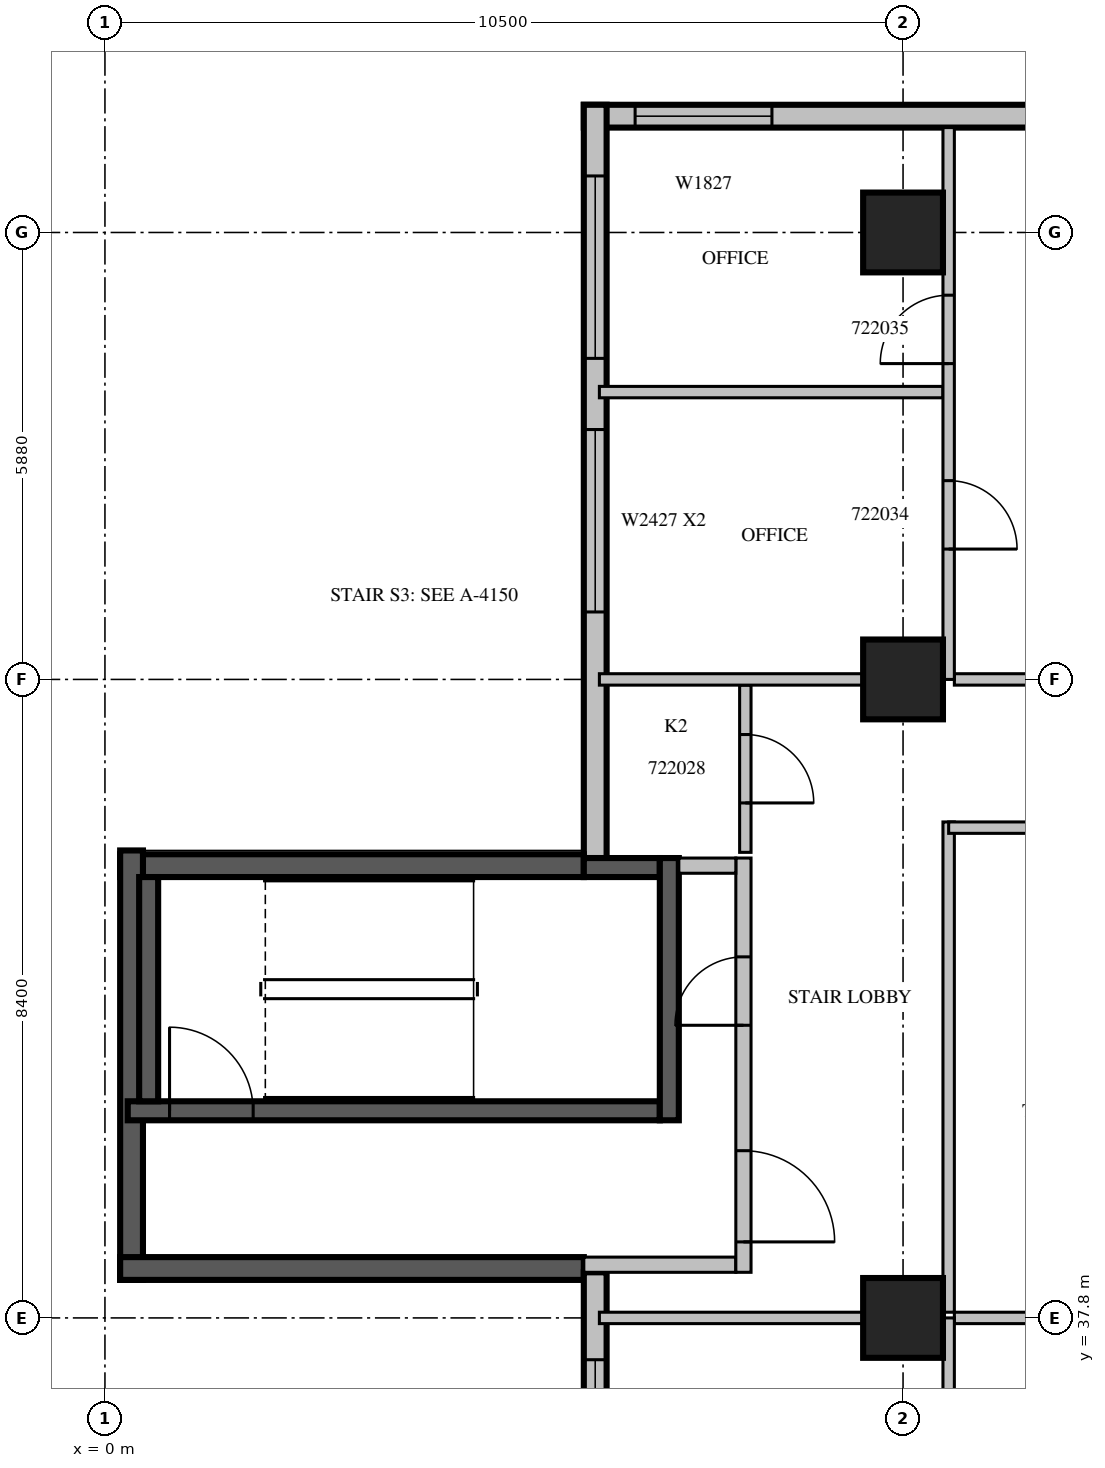
"""IFC4 building model, lengths in metres.
Left out: names, types, materials, properties, quantities, classifications, styles, units other than length and angle.
Written with IfcOpenShell. Run it as: python <this file> out.ifc"""

import sys

from ifc_helpers import new_model, si_unit, direction, frame, frame_2d, origin, origin_2d, place, context, subcontext, project, spatial, rectangle, extrude, source, transform, mapped, element, fill, save


model = new_model("IFC4")
c1 = context("Model", 3, precision=1e-05, world=origin(), true_north=direction((0.0, 1.0)))
c2 = subcontext(c1, "Body", "Model", "MODEL_VIEW")
j1 = project(units=[si_unit("LENGTHUNIT", "METRE"), si_unit("PLANEANGLEUNIT", "RADIAN")], contexts=[c1])
p1 = place(None, origin())
s1 = spatial("IfcSite", under=j1, at=p1, CompositionType="ELEMENT")
p2 = place(p1, origin())
s2 = spatial("IfcBuilding", under=s1, at=p2, CompositionType="ELEMENT")
p3 = place(p2, frame((0.0, 0.0, 103.5)))
s3 = spatial("IfcBuildingStorey", under=s2, at=p3, CompositionType="ELEMENT", Elevation=103.5)
m1 = source(origin(), c2, "Body", "SweptSolid", [
    extrude(rectangle(XDim=1.05, YDim=1.05, at=origin_2d()), origin(), (0.0, 0.0, 1.0), 4.2),
])
for number, where, z_axis, x_axis in (
    (1, (10.5, 37.8, 0.0), (0.0, 0.0, 1.0), (1.0, 0.0, 0.0)),
    (2, (10.5, 46.2, 0.0), (0.0, 0.0, 1.0), (1.0, 0.0, 0.0)),
    (3, (10.5, 52.08, 0.0), (0.0, 0.0, 1.0), (1.0, 0.0, 0.0)),
):
    element("IfcColumn", number, at=place(p3, frame(where, z_axis=z_axis, x_axis=x_axis)), inside=s3, PredefinedType="COLUMN", context=c2, shape_type="MappedRepresentation", body=[
        mapped(m1, transform((0.0, 0.0, 0.0), scale=1.0)),
    ])
m2 = source(origin(), c2, "Body", "SweptSolid", [
    extrude(rectangle(XDim=10.5, YDim=0.3, at=frame_2d((5.25, 0.0))), origin(), (0.0, 0.0, 1.0), 3.8),
])
p4 = place(p3, frame((16.8, 53.61, 0.0), z_axis=(0.0, 0.0, 1.0), x_axis=(-1.0, 0.0, 0.0)))
e4 = element("IfcWall", 4, at=p4, inside=s3, PredefinedType="STANDARD", context=c2, shape_type="MappedRepresentation", body=[
    mapped(m2, transform((0.0, 0.0, 0.0), scale=1.0)),
])
m3 = source(origin(), c2, "Body", "SweptSolid", [
    extrude(rectangle(XDim=1.2, YDim=2.7, at=frame_2d((0.6, 1.35))), frame((0.0, 0.16, 0.0), z_axis=(0.0, -1.0, 0.0), x_axis=(1.0, 0.0, 0.0)), (0.0, 0.0, 1.0), 0.32),
])
p5 = place(p4, frame((2.15, 0.0, 0.6)))
e5 = element("IfcOpeningElement", 5, at=p5, cuts=e4, PredefinedType="OPENING", context=c2, shape_type="MappedRepresentation", body=[
    mapped(m3, transform((0.0, 0.0, 0.0), scale=1.0)),
])
m4 = source(origin(), c2, "Body", "SweptSolid", [
    extrude(rectangle(XDim=1.8, YDim=2.7, at=frame_2d((0.9, 1.35))), frame((0.0, 0.16, 0.0), z_axis=(0.0, -1.0, 0.0), x_axis=(1.0, 0.0, 0.0)), (0.0, 0.0, 1.0), 0.32),
])
p6 = place(p4, frame((8.025, 0.0, 0.6)))
e6 = element("IfcOpeningElement", 6, at=p6, cuts=e4, PredefinedType="OPENING", context=c2, shape_type="MappedRepresentation", body=[
    mapped(m4, transform((0.0, 0.0, 0.0), scale=1.0)),
])
m5 = source(origin(), c2, "Body", "SweptSolid", [
    extrude(rectangle(XDim=9.91, YDim=0.3, at=frame_2d((4.955, 0.0))), origin(), (0.0, 0.0, 1.0), 3.8),
])
p7 = place(p3, frame((6.45, 53.76, 0.0), z_axis=(0.0, 0.0, 1.0), x_axis=(0.0, -1.0, 0.0)))
e7 = element("IfcWall", 7, at=p7, inside=s3, PredefinedType="STANDARD", context=c2, shape_type="MappedRepresentation", body=[
    mapped(m5, transform((0.0, 0.0, 0.0), scale=1.0)),
])
m6 = source(origin(), c2, "Body", "SweptSolid", [
    extrude(rectangle(XDim=2.4, YDim=2.7, at=frame_2d((1.2, 1.35))), frame((0.0, 0.16, 0.0), z_axis=(0.0, -1.0, 0.0), x_axis=(1.0, 0.0, 0.0)), (0.0, 0.0, 1.0), 0.32),
])
p8 = place(p7, frame((4.272, 0.0, 0.6)))
e8 = element("IfcOpeningElement", 8, at=p8, cuts=e7, PredefinedType="OPENING", context=c2, shape_type="MappedRepresentation", body=[
    mapped(m6, transform((0.0, 0.0, 0.0), scale=1.0)),
])
p9 = place(p7, frame((0.936, 0.0, 0.6)))
e9 = element("IfcOpeningElement", 9, at=p9, cuts=e7, PredefinedType="OPENING", context=c2, shape_type="MappedRepresentation", body=[
    mapped(m6, transform((0.0, 0.0, 0.0), scale=1.0)),
])
m7 = source(origin(), c2, "Body", "SweptSolid", [
    extrude(rectangle(XDim=6.1, YDim=0.3, at=frame_2d((3.05, 0.0))), origin(), (0.0, 0.0, 1.0), 3.8),
])
p10 = place(p3, frame((6.3, 43.75, 0.0), z_axis=(0.0, 0.0, 1.0), x_axis=(-1.0, 0.0, 0.0)))
e10 = element("IfcWall", 10, at=p10, inside=s3, PredefinedType="SOLIDWALL", context=c2, shape_type="MappedRepresentation", body=[
    mapped(m7, transform((0.0, 0.0, 0.0), scale=1.0)),
])
m8 = source(origin(), c2, "Body", "SweptSolid", [
    extrude(rectangle(XDim=5.65, YDim=0.3, at=frame_2d((2.825, 0.0))), origin(), (0.0, 0.0, 1.0), 3.8),
])
p11 = place(p3, frame((0.35, 43.95, 0.0), z_axis=(0.0, 0.0, 1.0), x_axis=(0.0, -1.0, 0.0)))
e11 = element("IfcWall", 11, at=p11, inside=s3, PredefinedType="SOLIDWALL", context=c2, shape_type="MappedRepresentation", body=[
    mapped(m8, transform((0.0, 0.0, 0.0), scale=1.0)),
])
p12 = place(p3, frame((0.2, 38.45, 0.0), z_axis=(0.0, 0.0, 1.0), x_axis=(1.0, 0.0, 0.0)))
e12 = element("IfcWall", 12, at=p12, inside=s3, PredefinedType="SOLIDWALL", context=c2, shape_type="MappedRepresentation", body=[
    mapped(m7, transform((0.0, 0.0, 0.0), scale=1.0)),
])
p13 = place(p3, frame((6.45, 38.4, 0.0), z_axis=(0.0, 0.0, 1.0), x_axis=(0.0, -1.0, 0.0)))
e13 = element("IfcWall", 13, at=p13, inside=s3, PredefinedType="STANDARD", context=c2, shape_type="SweptSolid", body=[
    extrude(rectangle(XDim=16.4, YDim=0.3, at=frame_2d((8.2, 0.0))), origin(), (0.0, 0.0, 1.0), 3.3),
])
p14 = place(p13, frame((1.15, 0.0, 0.6)))
e14 = element("IfcOpeningElement", 14, at=p14, cuts=e13, PredefinedType="OPENING", context=c2, shape_type="MappedRepresentation", body=[
    mapped(m4, transform((0.0, 0.0, 0.0), scale=1.0)),
])
p15 = place(p13, frame((4.75, 0.0, 0.6)))
e15 = element("IfcOpeningElement", 15, at=p15, cuts=e13, PredefinedType="OPENING", context=c2, shape_type="MappedRepresentation", body=[
    mapped(m6, transform((0.0, 0.0, 0.0), scale=1.0)),
])
p16 = place(p13, frame((9.438, 0.0, 0.6)))
e16 = element("IfcOpeningElement", 16, at=p16, cuts=e13, PredefinedType="OPENING", context=c2, shape_type="MappedRepresentation", body=[
    mapped(m4, transform((0.0, 0.0, 0.0), scale=1.0)),
])
p17 = place(p13, frame((13.537, 0.0, 0.6)))
e17 = element("IfcOpeningElement", 17, at=p17, cuts=e13, PredefinedType="OPENING", context=c2, shape_type="MappedRepresentation", body=[
    mapped(m4, transform((0.0, 0.0, 0.0), scale=1.0)),
])
m9 = source(origin(), c2, "Body", "SweptSolid", [
    extrude(rectangle(XDim=7.0, YDim=0.25, at=frame_2d((3.5, 0.0))), origin(), (0.0, 0.0, 1.0), 3.8),
])
p18 = place(p3, frame((0.3, 40.525, 0.0), z_axis=(0.0, 0.0, 1.0), x_axis=(1.0, 0.0, 0.0)))
e18 = element("IfcWall", 18, at=p18, inside=s3, PredefinedType="SOLIDWALL", context=c2, shape_type="MappedRepresentation", body=[
    mapped(m9, transform((0.0, 0.0, 0.0), scale=1.0)),
])
m10 = source(origin(), c2, "Body", "SweptSolid", [
    extrude(rectangle(XDim=1.1, YDim=2.1, at=frame_2d((0.55, 1.05))), frame((0.0, 0.135, 0.0), z_axis=(0.0, -1.0, 0.0), x_axis=(1.0, 0.0, 0.0)), (0.0, 0.0, 1.0), 0.27),
])
p19 = place(p18, frame((0.55, 0.0, 0.0)))
e19 = element("IfcOpeningElement", 19, at=p19, cuts=e18, PredefinedType="OPENING", context=c2, shape_type="MappedRepresentation", body=[
    mapped(m10, transform((0.0, 0.0, 0.0), scale=1.0)),
])
m11 = source(origin(), c2, "Body", "SweptSolid", [
    extrude(rectangle(XDim=1.0, YDim=0.25, at=frame_2d((0.5, 0.0))), origin(), (0.0, 0.0, 1.0), 3.8),
])
p20 = place(p3, frame((6.3, 43.725, 0.0), z_axis=(0.0, 0.0, 1.0), x_axis=(1.0, 0.0, 0.0)))
e20 = element("IfcWall", 20, at=p20, inside=s3, PredefinedType="SOLIDWALL", context=c2, shape_type="MappedRepresentation", body=[
    mapped(m11, transform((0.0, 0.0, 0.0), scale=1.0)),
])
m12 = source(origin(), c2, "Body", "SweptSolid", [
    extrude(rectangle(XDim=3.45, YDim=0.25, at=frame_2d((1.725, 0.0))), origin(), (0.0, 0.0, 1.0), 3.8),
])
p21 = place(p3, frame((7.425, 40.4, 0.0), z_axis=(0.0, 0.0, 1.0), x_axis=(0.0, 1.0, 0.0)))
e21 = element("IfcWall", 21, at=p21, inside=s3, PredefinedType="SOLIDWALL", context=c2, shape_type="MappedRepresentation", body=[
    mapped(m12, transform((0.0, 0.0, 0.0), scale=1.0)),
])
m13 = source(origin(), c2, "Body", "SweptSolid", [
    extrude(rectangle(XDim=2.95, YDim=0.25, at=frame_2d((1.475, 0.0))), origin(), (0.0, 0.0, 1.0), 3.8),
])
p22 = place(p3, frame((0.575, 40.65, 0.0), z_axis=(0.0, 0.0, 1.0), x_axis=(0.0, 1.0, 0.0)))
e22 = element("IfcWall", 22, at=p22, inside=s3, PredefinedType="SOLIDWALL", context=c2, shape_type="MappedRepresentation", body=[
    mapped(m13, transform((0.0, 0.0, 0.0), scale=1.0)),
])
m14 = source(origin(), c2, "Body", "SweptSolid", [
    extrude(rectangle(XDim=2.0, YDim=0.2, at=frame_2d((1.0, 0.0))), origin(), (0.0, 0.0, 1.0), 3.8),
])
p23 = place(p3, frame((6.3, 38.5, 0.0), z_axis=(0.0, 0.0, 1.0), x_axis=(1.0, 0.0, 0.0)))
e23 = element("IfcWall", 23, at=p23, inside=s3, PredefinedType="PARTITIONING", context=c2, shape_type="MappedRepresentation", body=[
    mapped(m14, transform((0.0, 0.0, 0.0), scale=1.0)),
])
m15 = source(origin(), c2, "Body", "SweptSolid", [
    extrude(rectangle(XDim=5.45, YDim=0.2, at=frame_2d((2.725, 0.0))), origin(), (0.0, 0.0, 1.0), 3.8),
])
p24 = place(p3, frame((8.4, 38.4, 0.0), z_axis=(0.0, 0.0, 1.0), x_axis=(0.0, 1.0, 0.0)))
e24 = element("IfcWall", 24, at=p24, inside=s3, PredefinedType="PARTITIONING", context=c2, shape_type="MappedRepresentation", body=[
    mapped(m15, transform((0.0, 0.0, 0.0), scale=1.0)),
])
m16 = source(origin(), c2, "Body", "SweptSolid", [
    extrude(rectangle(XDim=1.2, YDim=2.1, at=frame_2d((0.6, 1.05))), frame((0.0, 0.11, 0.0), z_axis=(0.0, -1.0, 0.0), x_axis=(1.0, 0.0, 0.0)), (0.0, 0.0, 1.0), 0.22),
])
p25 = place(p24, frame((0.4, 0.0, 0.0)))
e25 = element("IfcOpeningElement", 25, at=p25, cuts=e24, PredefinedType="OPENING", context=c2, shape_type="MappedRepresentation", body=[
    mapped(m16, transform((0.0, 0.0, 0.0), scale=1.0)),
])
m17 = source(origin(), c2, "Body", "SweptSolid", [
    extrude(rectangle(XDim=0.9, YDim=2.1, at=frame_2d((0.45, 1.05))), frame((0.0, 0.11, 0.0), z_axis=(0.0, -1.0, 0.0), x_axis=(1.0, 0.0, 0.0)), (0.0, 0.0, 1.0), 0.22),
])
p26 = place(p24, frame((3.25, 0.0, 0.0)))
e26 = element("IfcOpeningElement", 26, at=p26, cuts=e24, PredefinedType="OPENING", context=c2, shape_type="MappedRepresentation", body=[
    mapped(m17, transform((0.0, 0.0, 0.0), scale=1.0)),
])
m18 = source(origin(), c2, "Body", "SweptSolid", [
    extrude(rectangle(XDim=0.75, YDim=0.2, at=frame_2d((0.375, 0.0))), origin(), (0.0, 0.0, 1.0), 3.8),
])
p27 = place(p3, frame((7.55, 43.75, 0.0), z_axis=(0.0, 0.0, 1.0), x_axis=(1.0, 0.0, 0.0)))
e27 = element("IfcWall", 27, at=p27, inside=s3, PredefinedType="PARTITIONING", context=c2, shape_type="MappedRepresentation", body=[
    mapped(m18, transform((0.0, 0.0, 0.0), scale=1.0)),
])
m19 = source(origin(), c2, "Body", "SweptSolid", [
    extrude(rectangle(XDim=6.45, YDim=0.15, at=frame_2d((3.225, 0.0))), origin(), (0.0, 0.0, 1.0), 3.8),
])
p28 = place(p3, frame((11.1, 44.325, 0.0), z_axis=(0.0, 0.0, 1.0), x_axis=(0.0, -1.0, 0.0)))
e28 = element("IfcWall", 28, at=p28, inside=s3, PredefinedType="PARTITIONING", context=c2, shape_type="MappedRepresentation", body=[
    mapped(m19, transform((0.0, 0.0, 0.0), scale=1.0)),
])
m20 = source(origin(), c2, "Body", "SweptSolid", [
    extrude(rectangle(XDim=3.975, YDim=0.15, at=frame_2d((1.988, 0.0))), origin(), (0.0, 0.0, 1.0), 3.8),
])
p29 = place(p3, frame((15.075, 44.25, 0.0), z_axis=(0.0, 0.0, 1.0), x_axis=(-1.0, 0.0, 0.0)))
e29 = element("IfcWall", 29, at=p29, inside=s3, PredefinedType="PARTITIONING", context=c2, shape_type="MappedRepresentation", body=[
    mapped(m20, transform((0.0, 0.0, 0.0), scale=1.0)),
])
m21 = source(origin(), c2, "Body", "SweptSolid", [
    extrude(rectangle(XDim=2.2, YDim=0.15, at=frame_2d((1.1, 0.0))), origin(), (0.0, 0.0, 1.0), 3.8),
])
p30 = place(p3, frame((8.425, 43.925, 0.0), z_axis=(0.0, 0.0, 1.0), x_axis=(0.0, 1.0, 0.0)))
e30 = element("IfcWall", 30, at=p30, inside=s3, PredefinedType="PARTITIONING", context=c2, shape_type="MappedRepresentation", body=[
    mapped(m21, transform((0.0, 0.0, 0.0), scale=1.0)),
])
m22 = source(origin(), c2, "Body", "SweptSolid", [
    extrude(rectangle(XDim=0.9, YDim=2.1, at=frame_2d((0.45, 1.05))), frame((0.0, 0.085, 0.0), z_axis=(0.0, -1.0, 0.0), x_axis=(1.0, 0.0, 0.0)), (0.0, 0.0, 1.0), 0.17),
])
p31 = place(p30, frame((0.65, 0.0, 0.0)))
e31 = element("IfcOpeningElement", 31, at=p31, cuts=e30, PredefinedType="OPENING", context=c2, shape_type="MappedRepresentation", body=[
    mapped(m22, transform((0.0, 0.0, 0.0), scale=1.0)),
])
m23 = source(origin(), c2, "Body", "SweptSolid", [
    extrude(rectangle(XDim=3.471, YDim=0.15, at=frame_2d((1.736, 0.0))), origin(), (0.0, 0.0, 1.0), 3.8),
])
p32 = place(p3, frame((9.976, 37.8, 0.0), z_axis=(0.0, 0.0, 1.0), x_axis=(-1.0, 0.0, 0.0)))
e32 = element("IfcWall", 32, at=p32, inside=s3, PredefinedType="PARTITIONING", context=c2, shape_type="MappedRepresentation", body=[
    mapped(m23, transform((0.0, 0.0, 0.0), scale=1.0)),
])
m24 = source(origin(), c2, "Body", "SweptSolid", [
    extrude(rectangle(XDim=3.825, YDim=0.15, at=frame_2d((1.913, 0.0))), origin(), (0.0, 0.0, 1.0), 3.8),
])
p33 = place(p3, frame((15.0, 37.8, 0.0), z_axis=(0.0, 0.0, 1.0), x_axis=(-1.0, 0.0, 0.0)))
e33 = element("IfcWall", 33, at=p33, inside=s3, PredefinedType="PARTITIONING", context=c2, shape_type="MappedRepresentation", body=[
    mapped(m24, transform((0.0, 0.0, 0.0), scale=1.0)),
])
m25 = source(origin(), c2, "Body", "SweptSolid", [
    extrude(rectangle(XDim=8.4, YDim=0.15, at=frame_2d((4.2, 0.0))), origin(), (0.0, 0.0, 1.0), 3.3),
])
p34 = place(p3, frame((11.1, 29.4, 0.0), z_axis=(0.0, 0.0, 1.0), x_axis=(0.0, 1.0, 0.0)))
e34 = element("IfcWall", 34, at=p34, inside=s3, PredefinedType="PARTITIONING", context=c2, shape_type="MappedRepresentation", body=[
    mapped(m25, transform((0.0, 0.0, 0.0), scale=1.0)),
])
m26 = source(origin(), c2, "Body", "SweptSolid", [
    extrude(rectangle(XDim=1.1, YDim=2.1, at=frame_2d((0.55, 1.05))), frame((0.0, 0.085, 0.0), z_axis=(0.0, -1.0, 0.0), x_axis=(1.0, 0.0, 0.0)), (0.0, 0.0, 1.0), 0.17),
])
p35 = place(p34, frame((5.96, 0.0, 0.0)))
e35 = element("IfcOpeningElement", 35, at=p35, cuts=e34, PredefinedType="OPENING", context=c2, shape_type="MappedRepresentation", body=[
    mapped(m26, transform((0.0, 0.0, 0.0), scale=1.0)),
])
p36 = place(p3, frame((11.025, 49.98, 0.0), z_axis=(0.0, 0.0, 1.0), x_axis=(-1.0, 0.0, 0.0)))
e36 = element("IfcWall", 36, at=p36, inside=s3, PredefinedType="PARTITIONING", context=c2, shape_type="SweptSolid", body=[
    extrude(rectangle(XDim=4.52, YDim=0.15, at=frame_2d((2.26, 0.0))), origin(), (0.0, 0.0, 1.0), 3.8),
])
p37 = place(p3, frame((9.976, 46.2, 0.0), z_axis=(0.0, 0.0, 1.0), x_axis=(-1.0, 0.0, 0.0)))
e37 = element("IfcWall", 37, at=p37, inside=s3, PredefinedType="PARTITIONING", context=c2, shape_type="MappedRepresentation", body=[
    mapped(m23, transform((0.0, 0.0, 0.0), scale=1.0)),
])
p38 = place(p3, frame((15.0, 46.2, 0.0), z_axis=(0.0, 0.0, 1.0), x_axis=(-1.0, 0.0, 0.0)))
e38 = element("IfcWall", 38, at=p38, inside=s3, PredefinedType="PARTITIONING", context=c2, shape_type="MappedRepresentation", body=[
    mapped(m24, transform((0.0, 0.0, 0.0), scale=1.0)),
])
m27 = source(origin(), c2, "Body", "SweptSolid", [
    extrude(rectangle(XDim=7.26, YDim=0.15, at=frame_2d((3.63, 0.0))), origin(), (0.0, 0.0, 1.0), 3.8),
])
p39 = place(p3, frame((11.1, 46.2, 0.0), z_axis=(0.0, 0.0, 1.0), x_axis=(0.0, 1.0, 0.0)))
e39 = element("IfcWall", 39, at=p39, inside=s3, PredefinedType="PARTITIONING", context=c2, shape_type="MappedRepresentation", body=[
    mapped(m27, transform((0.0, 0.0, 0.0), scale=1.0)),
])
p40 = place(p39, frame((1.715, 0.0, 0.0)))
e40 = element("IfcOpeningElement", 40, at=p40, cuts=e39, PredefinedType="OPENING", context=c2, shape_type="MappedRepresentation", body=[
    mapped(m22, transform((0.0, 0.0, 0.0), scale=1.0)),
])
p41 = place(p39, frame((4.155, 0.0, 0.0)))
e41 = element("IfcOpeningElement", 41, at=p41, cuts=e39, PredefinedType="OPENING", context=c2, shape_type="MappedRepresentation", body=[
    mapped(m22, transform((0.0, 0.0, 0.0), scale=1.0)),
])
m28 = source(origin(), c2, "Body", "SweptSolid", [
    extrude(rectangle(XDim=1.8, YDim=2.7, at=frame_2d((0.9, 1.35))), frame((0.0, 0.03, 0.0), z_axis=(0.0, -1.0, 0.0), x_axis=(1.0, 0.0, 0.0)), (0.0, 0.0, 1.0), 0.06),
])
p42 = place(p6, origin())
e42 = element("IfcWindow", 42, at=p42, inside=s3, PartitioningType="SINGLE_PANEL", PredefinedType="WINDOW", context=c2, shape_type="MappedRepresentation", body=[
    mapped(m28, transform((0.0, 0.0, 0.0), scale=1.0)),
])
fill(e6, e42)
m29 = source(origin(), c2, "Body", "SweptSolid", [
    extrude(rectangle(XDim=2.4, YDim=2.7, at=frame_2d((1.2, 1.35))), frame((0.0, 0.03, 0.0), z_axis=(0.0, -1.0, 0.0), x_axis=(1.0, 0.0, 0.0)), (0.0, 0.0, 1.0), 0.06),
])
p43 = place(p8, origin())
e43 = element("IfcWindow", 43, at=p43, inside=s3, PartitioningType="SINGLE_PANEL", PredefinedType="WINDOW", context=c2, shape_type="MappedRepresentation", body=[
    mapped(m29, transform((0.0, 0.0, 0.0), scale=1.0)),
])
fill(e8, e43)
p44 = place(p9, origin())
e44 = element("IfcWindow", 44, at=p44, inside=s3, PartitioningType="SINGLE_PANEL", PredefinedType="WINDOW", context=c2, shape_type="MappedRepresentation", body=[
    mapped(m29, transform((0.0, 0.0, 0.0), scale=1.0)),
])
fill(e9, e44)
p45 = place(p14, origin())
e45 = element("IfcWindow", 45, at=p45, inside=s3, PartitioningType="SINGLE_PANEL", PredefinedType="WINDOW", context=c2, shape_type="MappedRepresentation", body=[
    mapped(m28, transform((0.0, 0.0, 0.0), scale=1.0)),
])
fill(e14, e45)
m30 = source(origin(), c2, "Body", "SweptSolid", [
    extrude(rectangle(XDim=1.1, YDim=2.1, at=frame_2d((0.55, 1.05))), frame((0.0, 0.025, 0.0), z_axis=(0.0, -1.0, 0.0), x_axis=(1.0, 0.0, 0.0)), (0.0, 0.0, 1.0), 0.05),
])
p46 = place(p19, origin())
e46 = element("IfcDoor", 46, at=p46, inside=s3, OperationType="SINGLE_SWING_LEFT", PredefinedType="DOOR", context=c2, shape_type="MappedRepresentation", body=[
    mapped(m30, transform((0.0, 0.0, 0.0), scale=1.0)),
])
fill(e19, e46)
m31 = source(origin(), c2, "Body", "SweptSolid", [
    extrude(rectangle(XDim=1.2, YDim=2.1, at=frame_2d((0.6, 1.05))), frame((0.0, 0.025, 0.0), z_axis=(0.0, -1.0, 0.0), x_axis=(1.0, 0.0, 0.0)), (0.0, 0.0, 1.0), 0.05),
])
p47 = place(p25, origin())
e47 = element("IfcDoor", 47, at=p47, inside=s3, OperationType="SINGLE_SWING_RIGHT", PredefinedType="DOOR", context=c2, shape_type="MappedRepresentation", body=[
    mapped(m31, transform((0.0, 0.0, 0.0), scale=1.0)),
])
fill(e25, e47)
m32 = source(origin(), c2, "Body", "SweptSolid", [
    extrude(rectangle(XDim=0.9, YDim=2.1, at=frame_2d((0.45, 1.05))), frame((0.0, 0.025, 0.0), z_axis=(0.0, -1.0, 0.0), x_axis=(1.0, 0.0, 0.0)), (0.0, 0.0, 1.0), 0.05),
])
p48 = place(p26, origin())
e48 = element("IfcDoor", 48, at=p48, inside=s3, OperationType="SINGLE_SWING_LEFT", PredefinedType="DOOR", context=c2, shape_type="MappedRepresentation", body=[
    mapped(m32, transform((0.0, 0.0, 0.0), scale=1.0)),
])
fill(e26, e48)
p49 = place(p31, origin())
e49 = element("IfcDoor", 49, at=p49, inside=s3, OperationType="SINGLE_SWING_RIGHT", PredefinedType="DOOR", context=c2, shape_type="MappedRepresentation", body=[
    mapped(m32, transform((0.0, 0.0, 0.0), scale=1.0)),
])
fill(e31, e49)
p50 = place(p40, origin())
e50 = element("IfcDoor", 50, at=p50, inside=s3, OperationType="SINGLE_SWING_RIGHT", PredefinedType="DOOR", context=c2, shape_type="MappedRepresentation", body=[
    mapped(m32, transform((0.0, 0.0, 0.0), scale=1.0)),
])
fill(e40, e50)
p51 = place(p41, origin())
e51 = element("IfcDoor", 51, at=p51, inside=s3, OperationType="SINGLE_SWING_LEFT", PredefinedType="DOOR", context=c2, shape_type="MappedRepresentation", body=[
    mapped(m32, transform((0.0, 0.0, 0.0), scale=1.0)),
])
fill(e41, e51)
save(model, sys.argv[1])
